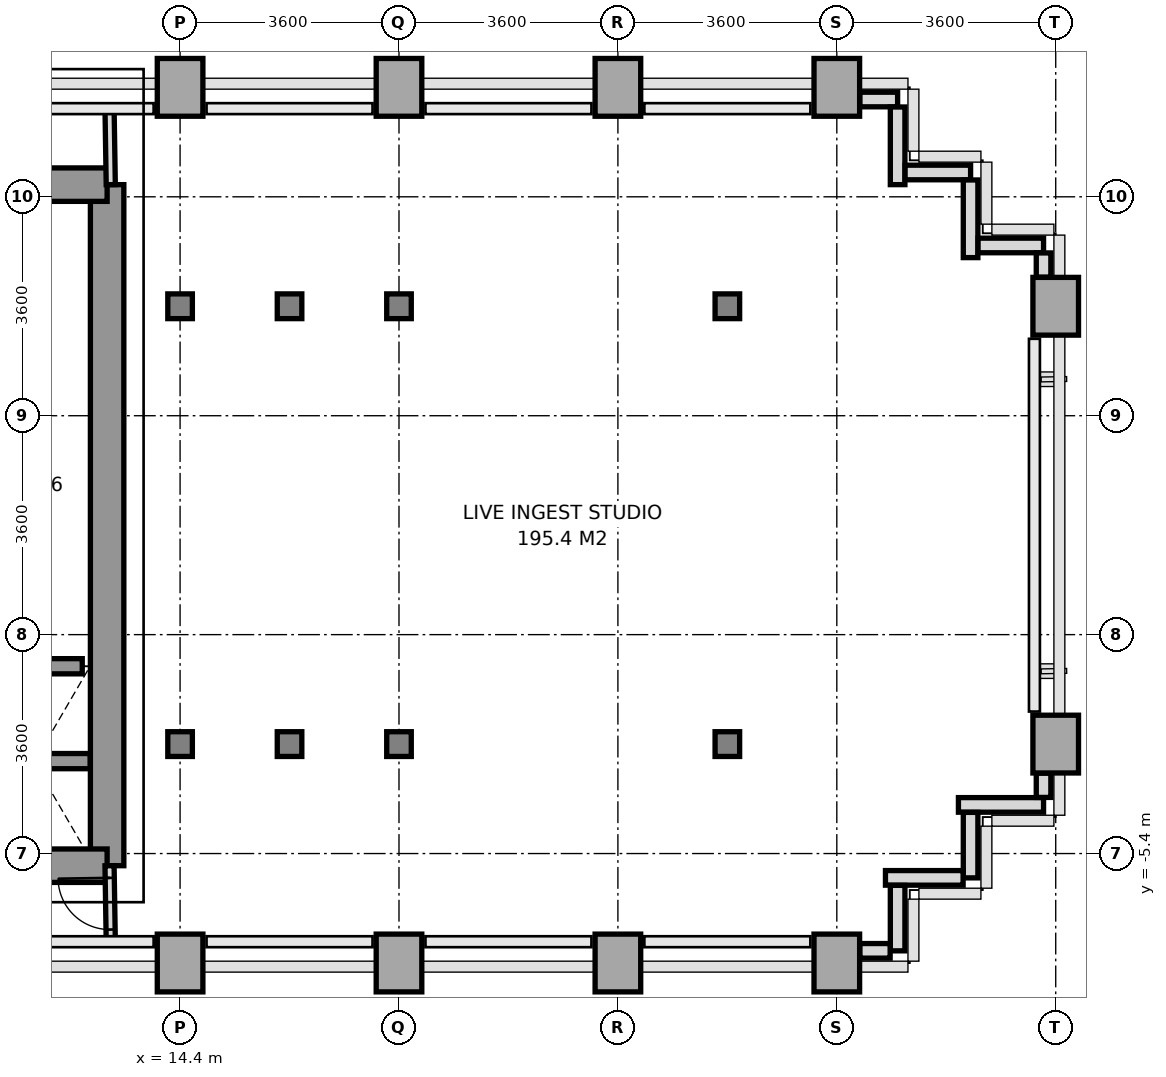
"""IFC4 building model, lengths in metres.
Left out: names, types, materials, properties, quantities, classifications, styles, units other than length and angle.
Written with IfcOpenShell. Run it as: python <this file> out.ifc"""

import sys

from ifc_helpers import new_model, si_unit, direction, frame, frame_2d, origin, origin_2d, place, context, subcontext, project, spatial, rectangle, i_section, extrude, source, transform, mapped, element, fill, save


model = new_model("IFC4")
c1 = context("Model", 3, precision=1e-05, world=origin(), true_north=direction((0.0, 1.0)))
c2 = subcontext(c1, "Body", "Model", "MODEL_VIEW")
j1 = project(units=[si_unit("LENGTHUNIT", "METRE"), si_unit("PLANEANGLEUNIT", "RADIAN")], contexts=[c1])
p1 = place(None, origin())
s1 = spatial("IfcSite", under=j1, at=p1, CompositionType="ELEMENT")
p2 = place(p1, origin())
s2 = spatial("IfcBuilding", under=s1, at=p2, CompositionType="ELEMENT")
p3 = place(p2, frame((0.0, 0.0, 30.6)))
s3 = spatial("IfcBuildingStorey", under=s2, at=p3, CompositionType="ELEMENT", Elevation=30.6)
m1 = source(origin(), c2, "Body", "SweptSolid", [
    extrude(rectangle(XDim=0.75, YDim=0.95, at=origin_2d()), origin(), (0.0, 0.0, 1.0), 3.2),
])
p4 = place(p3, frame((14.4, -7.2, 0.0), z_axis=(0.0, 0.0, 1.0), x_axis=(1.0, 0.0, 0.0)))
e1 = element("IfcColumn", 1, at=p4, inside=s3, PredefinedType="COLUMN", context=c2, shape_type="MappedRepresentation", body=[
    mapped(m1, transform((0.0, 0.0, 0.0), x_axis=(1.0, 0.0, 0.0), y_axis=(0.0, 1.0, 0.0), z_axis=(0.0, 0.0, 1.0), scale=1.0)),
])
m2 = source(origin(), c2, "Body", "SweptSolid", [
    extrude(i_section(OverallWidth=0.404, OverallDepth=0.407, WebThickness=0.022, FlangeThickness=0.035, at=origin_2d()), origin(), (0.0, 0.0, 1.0), 3.2),
])
for number, where, z_axis, x_axis in (
    (2, (14.4, -3.6, 0.0), (0.0, 0.0, 1.0), (1.0, 0.0, 0.0)),
    (3, (14.4, 3.6, 0.0), (0.0, 0.0, 1.0), (1.0, 0.0, 0.0)),
):
    element("IfcColumn", number, at=place(p3, frame(where, z_axis=z_axis, x_axis=x_axis)), inside=s3, PredefinedType="COLUMN", context=c2, shape_type="MappedRepresentation", body=[
        mapped(m2, transform((0.0, 0.0, 0.0), x_axis=(1.0, 0.0, 0.0), y_axis=(0.0, 1.0, 0.0), z_axis=(0.0, 0.0, 1.0), scale=1.0)),
    ])
p5 = place(p3, frame((14.4, 7.2, 0.0), z_axis=(0.0, 0.0, 1.0), x_axis=(1.0, 0.0, 0.0)))
e4 = element("IfcColumn", 4, at=p5, inside=s3, PredefinedType="COLUMN", context=c2, shape_type="MappedRepresentation", body=[
    mapped(m1, transform((0.0, 0.0, 0.0), x_axis=(1.0, 0.0, 0.0), y_axis=(0.0, 1.0, 0.0), z_axis=(0.0, 0.0, 1.0), scale=1.0)),
])
for number, where, z_axis, x_axis in (
    (5, (16.2, -3.6, 0.0), (0.0, 0.0, 1.0), (1.0, 0.0, 0.0)),
    (6, (16.2, 3.6, 0.0), (0.0, 0.0, 1.0), (1.0, 0.0, 0.0)),
):
    element("IfcColumn", number, at=place(p3, frame(where, z_axis=z_axis, x_axis=x_axis)), inside=s3, PredefinedType="COLUMN", context=c2, shape_type="MappedRepresentation", body=[
        mapped(m2, transform((0.0, 0.0, 0.0), x_axis=(1.0, 0.0, 0.0), y_axis=(0.0, 1.0, 0.0), z_axis=(0.0, 0.0, 1.0), scale=1.0)),
    ])
p6 = place(p3, frame((18.0, -7.2, 0.0), z_axis=(0.0, 0.0, 1.0), x_axis=(1.0, 0.0, 0.0)))
e7 = element("IfcColumn", 7, at=p6, inside=s3, PredefinedType="COLUMN", context=c2, shape_type="MappedRepresentation", body=[
    mapped(m1, transform((0.0, 0.0, 0.0), x_axis=(1.0, 0.0, 0.0), y_axis=(0.0, 1.0, 0.0), z_axis=(0.0, 0.0, 1.0), scale=1.0)),
])
for number, where, z_axis, x_axis in (
    (8, (18.0, -3.6, 0.0), (0.0, 0.0, 1.0), (1.0, 0.0, 0.0)),
    (9, (18.0, 3.6, 0.0), (0.0, 0.0, 1.0), (1.0, 0.0, 0.0)),
):
    element("IfcColumn", number, at=place(p3, frame(where, z_axis=z_axis, x_axis=x_axis)), inside=s3, PredefinedType="COLUMN", context=c2, shape_type="MappedRepresentation", body=[
        mapped(m2, transform((0.0, 0.0, 0.0), x_axis=(1.0, 0.0, 0.0), y_axis=(0.0, 1.0, 0.0), z_axis=(0.0, 0.0, 1.0), scale=1.0)),
    ])
for number, where, z_axis, x_axis in (
    (10, (18.0, 7.2, 0.0), (0.0, 0.0, 1.0), (1.0, 0.0, 0.0)),
    (11, (21.6, -7.2, 0.0), (0.0, 0.0, 1.0), (1.0, 0.0, 0.0)),
    (12, (21.6, 7.2, 0.0), (0.0, 0.0, 1.0), (1.0, 0.0, 0.0)),
):
    element("IfcColumn", number, at=place(p3, frame(where, z_axis=z_axis, x_axis=x_axis)), inside=s3, PredefinedType="COLUMN", context=c2, shape_type="MappedRepresentation", body=[
        mapped(m1, transform((0.0, 0.0, 0.0), x_axis=(1.0, 0.0, 0.0), y_axis=(0.0, 1.0, 0.0), z_axis=(0.0, 0.0, 1.0), scale=1.0)),
    ])
for number, where, z_axis, x_axis in (
    (13, (23.4, -3.6, 0.0), (0.0, 0.0, 1.0), (1.0, 0.0, 0.0)),
    (14, (23.4, 3.6, 0.0), (0.0, 0.0, 1.0), (1.0, 0.0, 0.0)),
):
    element("IfcColumn", number, at=place(p3, frame(where, z_axis=z_axis, x_axis=x_axis)), inside=s3, PredefinedType="COLUMN", context=c2, shape_type="MappedRepresentation", body=[
        mapped(m2, transform((0.0, 0.0, 0.0), x_axis=(1.0, 0.0, 0.0), y_axis=(0.0, 1.0, 0.0), z_axis=(0.0, 0.0, 1.0), scale=1.0)),
    ])
for number, where, z_axis, x_axis in (
    (15, (25.2, -7.2, 0.0), (0.0, 0.0, 1.0), (1.0, 0.0, 0.0)),
    (16, (25.2, 7.2, 0.0), (0.0, 0.0, 1.0), (1.0, 0.0, 0.0)),
    (17, (28.8, -3.6, 0.0), (0.0, 0.0, 1.0), (1.0, 0.0, 0.0)),
    (18, (28.8, 3.6, 0.0), (0.0, 0.0, 1.0), (1.0, 0.0, 0.0)),
):
    element("IfcColumn", number, at=place(p3, frame(where, z_axis=z_axis, x_axis=x_axis)), inside=s3, PredefinedType="COLUMN", context=c2, shape_type="MappedRepresentation", body=[
        mapped(m1, transform((0.0, 0.0, 0.0), x_axis=(1.0, 0.0, 0.0), y_axis=(0.0, 1.0, 0.0), z_axis=(0.0, 0.0, 1.0), scale=1.0)),
    ])
p7 = place(p3, frame((28.6, -4.6, 0.0), z_axis=(0.0, 0.0, 1.0), x_axis=(-1.0, 0.0, 0.0)))
e19 = element("IfcWall", 19, at=p7, inside=s3, PredefinedType="PARAPET", context=c2, shape_type="SweptSolid", body=[
    extrude(rectangle(XDim=1.4, YDim=0.24, at=frame_2d((0.7, 0.0))), origin(), (0.0, 0.0, 1.0), 1.15),
])
p8 = place(p3, frame((27.4, -4.723, 0.0), z_axis=(0.0, 0.0, 1.0), x_axis=(0.0, -1.0, 0.0)))
e20 = element("IfcWall", 20, at=p8, inside=s3, PredefinedType="PARAPET", context=c2, shape_type="SweptSolid", body=[
    extrude(rectangle(XDim=1.077, YDim=0.24, at=frame_2d((0.539, 0.0))), origin(), (0.0, 0.0, 1.0), 1.15),
])
p9 = place(p3, frame((27.277, -5.8, 0.0), z_axis=(0.0, 0.0, 1.0), x_axis=(-1.0, 0.0, 0.0)))
e21 = element("IfcWall", 21, at=p9, inside=s3, PredefinedType="PARAPET", context=c2, shape_type="SweptSolid", body=[
    extrude(rectangle(XDim=1.277, YDim=0.24, at=frame_2d((0.639, 0.0))), origin(), (0.0, 0.0, 1.0), 1.15),
])
p10 = place(p3, frame((26.2, -5.923, 0.0), z_axis=(0.0, 0.0, 1.0), x_axis=(0.0, -1.0, 0.0)))
e22 = element("IfcWall", 22, at=p10, inside=s3, PredefinedType="PARAPET", context=c2, shape_type="SweptSolid", body=[
    extrude(rectangle(XDim=1.077, YDim=0.24, at=frame_2d((0.539, 0.0))), origin(), (0.0, 0.0, 1.0), 1.15),
])
p11 = place(p3, frame((26.077, -7.0, 0.0), z_axis=(0.0, 0.0, 1.0), x_axis=(-1.0, 0.0, 0.0)))
e23 = element("IfcWall", 23, at=p11, inside=s3, PredefinedType="PARAPET", context=c2, shape_type="SweptSolid", body=[
    extrude(rectangle(XDim=0.499, YDim=0.24, at=frame_2d((0.25, 0.0))), origin(), (0.0, 0.0, 1.0), 1.15),
])
p12 = place(p3, frame((25.578, 7.0, 0.0), z_axis=(0.0, 0.0, 1.0), x_axis=(1.0, 0.0, 0.0)))
e24 = element("IfcWall", 24, at=p12, inside=s3, PredefinedType="PARAPET", context=c2, shape_type="SweptSolid", body=[
    extrude(rectangle(XDim=0.622, YDim=0.24, at=frame_2d((0.311, 0.0))), origin(), (0.0, 0.0, 1.0), 1.15),
])
p13 = place(p3, frame((26.2, 6.877, 0.0), z_axis=(0.0, 0.0, 1.0), x_axis=(0.0, -1.0, 0.0)))
e25 = element("IfcWall", 25, at=p13, inside=s3, PredefinedType="PARAPET", context=c2, shape_type="SweptSolid", body=[
    extrude(rectangle(XDim=1.277, YDim=0.24, at=frame_2d((0.638, 0.0))), origin(), (0.0, 0.0, 1.0), 1.15),
])
p14 = place(p3, frame((26.323, 5.8, 0.0), z_axis=(0.0, 0.0, 1.0), x_axis=(1.0, 0.0, 0.0)))
e26 = element("IfcWall", 26, at=p14, inside=s3, PredefinedType="PARAPET", context=c2, shape_type="SweptSolid", body=[
    extrude(rectangle(XDim=1.077, YDim=0.24, at=frame_2d((0.539, 0.0))), origin(), (0.0, 0.0, 1.0), 1.15),
])
p15 = place(p3, frame((27.4, 5.677, 0.0), z_axis=(0.0, 0.0, 1.0), x_axis=(0.0, -1.0, 0.0)))
e27 = element("IfcWall", 27, at=p15, inside=s3, PredefinedType="PARAPET", context=c2, shape_type="SweptSolid", body=[
    extrude(rectangle(XDim=1.277, YDim=0.24, at=frame_2d((0.639, 0.0))), origin(), (0.0, 0.0, 1.0), 1.15),
])
p16 = place(p3, frame((27.523, 4.6, 0.0), z_axis=(0.0, 0.0, 1.0), x_axis=(1.0, 0.0, 0.0)))
e28 = element("IfcWall", 28, at=p16, inside=s3, PredefinedType="PARAPET", context=c2, shape_type="SweptSolid", body=[
    extrude(rectangle(XDim=1.077, YDim=0.24, at=frame_2d((0.539, 0.0))), origin(), (0.0, 0.0, 1.0), 1.15),
])
for number, where, z_axis, x_axis in (
    (29, (28.6, 4.477, 0.0), (0.0, 0.0, 1.0), (0.0, -1.0, 0.0)),
    (30, (28.6, -4.078, 0.0), (0.0, 0.0, 1.0), (0.0, -1.0, 0.0)),
):
    element("IfcWall", number, at=place(p3, frame(where, z_axis=z_axis, x_axis=x_axis)), inside=s3, PredefinedType="PARAPET", context=c2, shape_type="SweptSolid", body=[
        extrude(rectangle(XDim=0.399, YDim=0.24, at=frame_2d((0.2, 0.0))), origin(), (0.0, 0.0, 1.0), 1.15),
    ])
p17 = place(p3, frame((13.2, -5.6, 0.0), z_axis=(0.0, 0.0, 1.0), x_axis=(0.0, 1.0, 0.0)))
e31 = element("IfcWall", 31, at=p17, inside=s3, PredefinedType="SHEAR", context=c2, shape_type="SweptSolid", body=[
    extrude(rectangle(XDim=11.2, YDim=0.55, at=frame_2d((5.6, 0.0))), origin(), (0.0, 0.0, 1.0), 3.2),
])
p18 = place(p3, frame((11.381, 5.6, 0.0), z_axis=(0.0, 0.0, 1.0), x_axis=(1.0, 0.0, 0.0)))
e32 = element("IfcWall", 32, at=p18, inside=s3, PredefinedType="SHEAR", context=c2, shape_type="SweptSolid", body=[
    extrude(rectangle(XDim=1.819, YDim=0.55, at=frame_2d((0.909, 0.0))), origin(), (0.0, 0.0, 1.0), 3.2),
])
p19 = place(p3, frame((5.4, -5.6, 0.0), z_axis=(0.0, 0.0, 1.0), x_axis=(1.0, 0.0, 0.0)))
e33 = element("IfcWall", 33, at=p19, inside=s3, PredefinedType="SHEAR", context=c2, shape_type="SweptSolid", body=[
    extrude(rectangle(XDim=7.8, YDim=0.55, at=frame_2d((3.9, 0.0))), origin(), (0.0, 0.0, 1.0), 3.2),
])
p20 = place(p19, frame((3.0, 0.0, 0.0)))
e34 = element("IfcOpeningElement", 34, at=p20, cuts=e33, PredefinedType="OPENING", context=c2, shape_type="SweptSolid", body=[
    extrude(rectangle(XDim=1.2, YDim=2.2, at=frame_2d((0.6, 1.1))), frame((0.0, 0.285, 0.0), z_axis=(0.0, -1.0, 0.0), x_axis=(1.0, 0.0, 0.0)), (0.0, 0.0, 1.0), 0.57),
])
p21 = place(p3, frame((11.08, -3.88, 0.0), z_axis=(0.0, 0.0, 1.0), x_axis=(1.0, 0.0, 0.0)))
e35 = element("IfcWall", 35, at=p21, inside=s3, PredefinedType="SOLIDWALL", context=c2, shape_type="SweptSolid", body=[
    extrude(rectangle(XDim=1.84, YDim=0.25, at=frame_2d((0.92, 0.0))), origin(), (0.0, 0.0, 1.0), 3.2),
])
p22 = place(p3, frame((11.209, -2.32, 0.0), z_axis=(0.0, 0.0, 1.0), x_axis=(1.0, 0.0, 0.0)))
e36 = element("IfcWall", 36, at=p22, inside=s3, PredefinedType="SOLIDWALL", context=c2, shape_type="SweptSolid", body=[
    extrude(rectangle(XDim=1.582, YDim=0.25, at=frame_2d((0.791, 0.0))), origin(), (0.0, 0.0, 1.0), 3.2),
])
p23 = place(p3, frame((13.26, 5.6, 0.0), z_axis=(0.0, 0.0, 1.0), x_axis=(-0.016013571389, 0.999871774545, 0.0)))
e37 = element("IfcWall", 37, at=p23, inside=s3, PredefinedType="PARTITIONING", context=c2, shape_type="SweptSolid", body=[
    extrude(rectangle(XDim=1.25, YDim=0.15, at=frame_2d((0.625, 0.0))), origin(), (0.0, 0.0, 1.0), 3.2),
])
p24 = place(p3, frame((13.26, -6.85, 0.0), z_axis=(0.0, 0.0, 1.0), x_axis=(-0.016013571389, 0.999871774545, 0.0)))
e38 = element("IfcWall", 38, at=p24, inside=s3, PredefinedType="PARTITIONING", context=c2, shape_type="SweptSolid", body=[
    extrude(rectangle(XDim=1.25, YDim=0.15, at=frame_2d((0.625, 0.0))), origin(), (0.0, 0.0, 1.0), 3.2),
])
p25 = place(p24, frame((0.2, 0.0, 0.0)))
e39 = element("IfcOpeningElement", 39, at=p25, cuts=e38, PredefinedType="OPENING", context=c2, shape_type="SweptSolid", body=[
    extrude(rectangle(XDim=0.85, YDim=2.1, at=frame_2d((0.425, 1.05))), frame((0.0, 0.085, 0.0), z_axis=(0.0, -1.0, 0.0), x_axis=(1.0, 0.0, 0.0)), (0.0, 0.0, 1.0), 0.17),
])
m3 = source(origin(), c2, "Body", "SweptSolid", [
    extrude(rectangle(XDim=0.85, YDim=2.1, at=frame_2d((0.425, 1.05))), frame((0.0, 0.025, 0.0), z_axis=(0.0, -1.0, 0.0), x_axis=(1.0, 0.0, 0.0)), (0.0, 0.0, 1.0), 0.05),
])
p26 = place(p25, origin())
e40 = element("IfcDoor", 40, at=p26, inside=s3, OperationType="SINGLE_SWING_RIGHT", PredefinedType="DOOR", context=c2, shape_type="MappedRepresentation", body=[
    mapped(m3, transform((0.0, 0.0, 0.0), x_axis=(1.0, 0.0, 0.0), y_axis=(0.0, 1.0, 0.0), z_axis=(0.0, 0.0, 1.0), scale=1.0)),
])
fill(e39, e40)
save(model, sys.argv[1])
